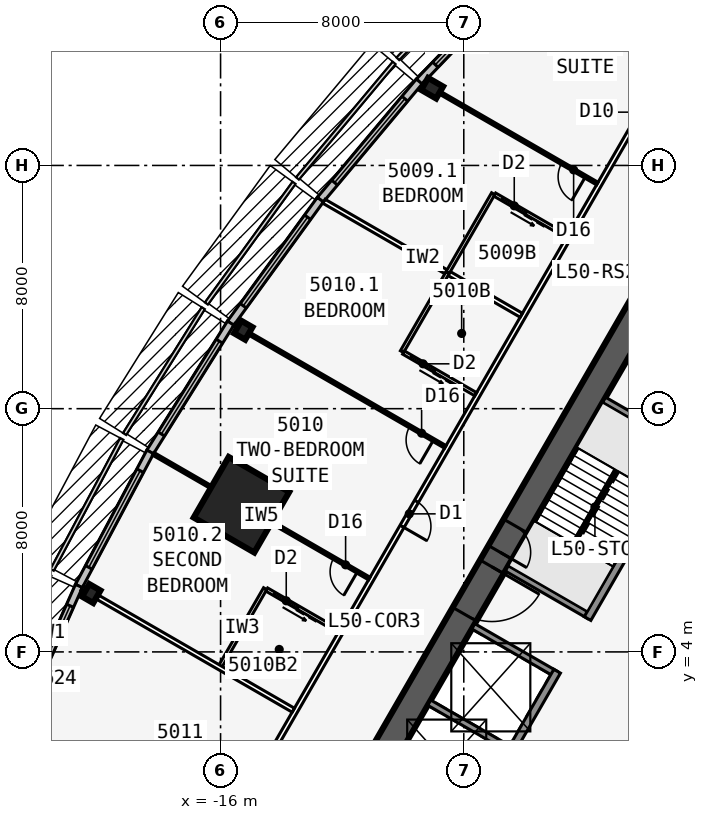
"""IFC4 building model, lengths in metres.
Left out: names, types, materials, properties, quantities, classifications, styles, units other than length and angle.
Written with IfcOpenShell. Run it as: python <this file> out.ifc"""

import sys

from ifc_helpers import new_model, si_unit, direction, frame, frame_2d, origin, origin_2d, place, context, subcontext, project, spatial, rectangle, i_section, extrude, element, fill, save


model = new_model("IFC4")
c1 = context("Model", 3, precision=1e-05, world=origin(), true_north=direction((0.0, 1.0)))
c2 = subcontext(c1, "Body", "Model", "MODEL_VIEW")
j1 = project(units=[si_unit("LENGTHUNIT", "METRE"), si_unit("PLANEANGLEUNIT", "RADIAN")], contexts=[c1])
p1 = place(None, origin())
s1 = spatial("IfcSite", under=j1, at=p1, CompositionType="ELEMENT")
p2 = place(p1, origin())
s2 = spatial("IfcBuilding", under=s1, at=p2, CompositionType="ELEMENT")
p3 = place(p2, frame((0.0, 0.0, 186.1)))
s3 = spatial("IfcBuildingStorey", under=s2, at=p3, CompositionType="ELEMENT", Elevation=186.1)
p4 = place(p3, frame((0.0, 19.052, 0.0), z_axis=(0.0, 0.0, 1.0), x_axis=(-0.499999749417, -0.866025548458, 0.0)))
e1 = element("IfcWall", 1, at=p4, inside=s3, PredefinedType="SHEAR", context=c2, shape_type="SweptSolid", body=[
    extrude(rectangle(XDim=33.0, YDim=0.9, at=frame_2d((16.5, 0.0))), origin(), (0.0, 0.0, 1.0), 3.4),
])
p5 = place(p4, frame((14.15, 0.0, 0.0)))
e2 = element("IfcOpeningElement", 2, at=p5, cuts=e1, PredefinedType="OPENING", context=c2, shape_type="SweptSolid", body=[
    extrude(rectangle(XDim=1.8, YDim=2.13, at=frame_2d((0.9, 1.065))), frame((0.0, 0.46, 0.0), z_axis=(0.0, -1.0, 0.0), x_axis=(1.0, 0.0, 0.0)), (0.0, 0.0, 1.0), 0.92),
])
p6 = place(p4, frame((12.6, 0.0, 0.0)))
e3 = element("IfcOpeningElement", 3, at=p6, cuts=e1, PredefinedType="OPENING", context=c2, shape_type="SweptSolid", body=[
    extrude(rectangle(XDim=1.0, YDim=2.13, at=frame_2d((0.5, 1.065))), frame((0.0, 0.46, 0.0), z_axis=(0.0, -1.0, 0.0), x_axis=(1.0, 0.0, 0.0)), (0.0, 0.0, 1.0), 0.92),
])
p7 = place(p3, frame((-0.062, 11.794, 0.0), z_axis=(0.0, 0.0, 1.0), x_axis=(-0.500006680225, -0.86602154692, 0.0)))
e4 = element("IfcWall", 4, at=p7, inside=s3, PredefinedType="SOLIDWALL", context=c2, shape_type="SweptSolid", body=[
    extrude(rectangle(XDim=7.733, YDim=0.25, at=frame_2d((3.866, 0.0))), origin(), (0.0, 0.0, 1.0), 3.15),
])
p8 = place(p3, frame((-4.929, 3.365, 0.0), z_axis=(0.0, 0.0, 1.0), x_axis=(-0.499991433582, -0.866030349552, 0.0)))
e5 = element("IfcWall", 5, at=p8, inside=s3, PredefinedType="SOLIDWALL", context=c2, shape_type="SweptSolid", body=[
    extrude(rectangle(XDim=10.633, YDim=0.25, at=frame_2d((5.316, 0.0))), origin(), (0.0, 0.0, 1.0), 3.15),
])
p9 = place(p8, frame((9.164, 0.0, 0.0)))
e6 = element("IfcOpeningElement", 6, at=p9, cuts=e5, PredefinedType="OPENING", context=c2, shape_type="SweptSolid", body=[
    extrude(rectangle(XDim=0.9, YDim=2.13, at=frame_2d((0.45, 1.065))), frame((0.0, 0.135, 0.0), z_axis=(0.0, -1.0, 0.0), x_axis=(1.0, 0.0, 0.0)), (0.0, 0.0, 1.0), 0.27),
])
for number, where, z_axis, x_axis in (
    (7, (-0.679, 10.727, 0.0), (0.0, 0.0, 1.0), (-0.866, 0.5, 0.0)),
    (8, (-3.879, 5.184, 0.0), (0.0, 0.0, 1.0), (-0.866, 0.5, 0.0)),
    (9, (-4.979, 3.279, 0.0), (0.0, 0.0, 1.0), (-0.866, 0.5, 0.0)),
    (10, (-6.429, 0.767, 0.0), (0.0, 0.0, 1.0), (-0.866, 0.5, 0.0)),
):
    element("IfcWall", number, at=place(p3, frame(where, z_axis=z_axis, x_axis=x_axis)), inside=s3, PredefinedType="SOLIDWALL", context=c2, shape_type="SweptSolid", body=[
        extrude(rectangle(XDim=3.125, YDim=0.2, at=frame_2d((1.562, 0.0))), origin(), (0.0, 0.0, 1.0), 3.15),
    ])
p10 = place(p3, frame((-9.041, 22.541, 0.0), z_axis=(0.0, 0.0, 1.0), x_axis=(-0.5, -0.866025403784, 0.0)))
e11 = element("IfcColumn", 11, at=p10, inside=s3, PredefinedType="COLUMN", context=c2, shape_type="SweptSolid", body=[
    extrude(i_section(OverallWidth=0.455, OverallDepth=0.569, WebThickness=0.078, FlangeThickness=0.125, at=origin_2d()), origin(), (0.0, 0.0, 1.0), 3.4),
])
for number, where, z_axis, x_axis in (
    (12, (-15.254, 14.58, 0.0), (0.0, 0.0, 1.0), (-0.866, 0.5, 0.0)),
    (13, (-20.254, 5.92, 0.0), (0.0, 0.0, 1.0), (-0.866, 0.5, 0.0)),
):
    element("IfcColumn", number, at=place(p3, frame(where, z_axis=z_axis, x_axis=x_axis)), inside=s3, PredefinedType="COLUMN", context=c2, shape_type="SweptSolid", body=[
        extrude(i_section(OverallWidth=0.424, OverallDepth=0.475, WebThickness=0.048, FlangeThickness=0.077, at=origin_2d()), origin(), (0.0, 0.0, 1.0), 3.4),
    ])
p11 = place(p3, frame((-15.312, 8.84, 0.0), z_axis=(0.0, 0.0, 1.0), x_axis=(-0.866025403784, 0.5, 0.0)))
e14 = element("IfcColumn", 14, at=p11, inside=s3, PredefinedType="COLUMN", context=c2, shape_type="SweptSolid", body=[
    extrude(rectangle(XDim=2.3, YDim=2.3, at=origin_2d()), origin(), (0.0, 0.0, 1.0), 3.4),
])
p12 = place(p3, frame((-5.91, 26.472, 0.0), z_axis=(0.0, 0.0, 1.0), x_axis=(-0.691719937936, -0.722165858693, 0.0)))
e15 = element("IfcWall", 15, at=p12, inside=s3, PredefinedType="STANDARD", context=c2, shape_type="SweptSolid", body=[
    extrude(rectangle(XDim=5.148, YDim=0.25, at=frame_2d((2.574, 0.0))), origin(), (0.0, 0.0, 1.0), 3.15),
])
p13 = place(p12, frame((0.774, 0.0, 0.45)))
e16 = element("IfcOpeningElement", 16, at=p13, cuts=e15, PredefinedType="OPENING", context=c2, shape_type="SweptSolid", body=[
    extrude(rectangle(XDim=3.6, YDim=2.4, at=frame_2d((1.8, 1.2))), frame((0.0, 0.135, 0.0), z_axis=(0.0, -1.0, 0.0), x_axis=(1.0, 0.0, 0.0)), (0.0, 0.0, 1.0), 0.27),
])
p14 = place(p3, frame((-9.465, 22.76, 0.0), z_axis=(0.0, 0.0, 1.0), x_axis=(-0.641810386606, -0.766863369607, 0.0)))
e17 = element("IfcWall", 17, at=p14, inside=s3, PredefinedType="STANDARD", context=c2, shape_type="SweptSolid", body=[
    extrude(rectangle(XDim=5.076, YDim=0.25, at=frame_2d((2.538, 0.0))), origin(), (0.0, 0.0, 1.0), 3.15),
])
p15 = place(p14, frame((0.738, 0.0, 0.45)))
e18 = element("IfcOpeningElement", 18, at=p15, cuts=e17, PredefinedType="OPENING", context=c2, shape_type="SweptSolid", body=[
    extrude(rectangle(XDim=3.6, YDim=2.4, at=frame_2d((1.8, 1.2))), frame((0.0, 0.135, 0.0), z_axis=(0.0, -1.0, 0.0), x_axis=(1.0, 0.0, 0.0)), (0.0, 0.0, 1.0), 0.27),
])
p16 = place(p3, frame((-12.718, 18.875, 0.0), z_axis=(0.0, 0.0, 1.0), x_axis=(-0.587669188412, -0.809101307001, 0.0)))
e19 = element("IfcWall", 19, at=p16, inside=s3, PredefinedType="STANDARD", context=c2, shape_type="SweptSolid", body=[
    extrude(rectangle(XDim=5.028, YDim=0.25, at=frame_2d((2.514, 0.0))), origin(), (0.0, 0.0, 1.0), 3.15),
])
p17 = place(p16, frame((0.714, 0.0, 0.45)))
e20 = element("IfcOpeningElement", 20, at=p17, cuts=e19, PredefinedType="OPENING", context=c2, shape_type="SweptSolid", body=[
    extrude(rectangle(XDim=3.6, YDim=2.4, at=frame_2d((1.8, 1.2))), frame((0.0, 0.135, 0.0), z_axis=(0.0, -1.0, 0.0), x_axis=(1.0, 0.0, 0.0)), (0.0, 0.0, 1.0), 0.27),
])
p18 = place(p3, frame((-15.667, 14.814, 0.0), z_axis=(0.0, 0.0, 1.0), x_axis=(-0.529990167382, -0.84800378683, 0.0)))
e21 = element("IfcWall", 21, at=p18, inside=s3, PredefinedType="STANDARD", context=c2, shape_type="SweptSolid", body=[
    extrude(rectangle(XDim=5.003, YDim=0.25, at=frame_2d((2.501, 0.0))), origin(), (0.0, 0.0, 1.0), 3.15),
])
p19 = place(p18, frame((0.701, 0.0, 0.45)))
e22 = element("IfcOpeningElement", 22, at=p19, cuts=e21, PredefinedType="OPENING", context=c2, shape_type="SweptSolid", body=[
    extrude(rectangle(XDim=3.6, YDim=2.4, at=frame_2d((1.8, 1.2))), frame((0.0, 0.135, 0.0), z_axis=(0.0, -1.0, 0.0), x_axis=(1.0, 0.0, 0.0)), (0.0, 0.0, 1.0), 0.27),
])
p20 = place(p3, frame((-18.314, 10.579, 0.0), z_axis=(0.0, 0.0, 1.0), x_axis=(-0.469404966864, -0.882982999317, 0.0)))
e23 = element("IfcWall", 23, at=p20, inside=s3, PredefinedType="STANDARD", context=c2, shape_type="SweptSolid", body=[
    extrude(rectangle(XDim=5.003, YDim=0.25, at=frame_2d((2.501, 0.0))), origin(), (0.0, 0.0, 1.0), 3.15),
])
p21 = place(p20, frame((0.701, 0.0, 0.45)))
e24 = element("IfcOpeningElement", 24, at=p21, cuts=e23, PredefinedType="OPENING", context=c2, shape_type="SweptSolid", body=[
    extrude(rectangle(XDim=3.6, YDim=2.4, at=frame_2d((1.8, 1.2))), frame((0.0, 0.135, 0.0), z_axis=(0.0, -1.0, 0.0), x_axis=(1.0, 0.0, 0.0)), (0.0, 0.0, 1.0), 0.27),
])
p22 = place(p3, frame((-20.659, 6.169, 0.0), z_axis=(0.0, 0.0, 1.0), x_axis=(-0.406832200364, -0.913502906808, 0.0)))
e25 = element("IfcWall", 25, at=p22, inside=s3, PredefinedType="STANDARD", context=c2, shape_type="SweptSolid", body=[
    extrude(rectangle(XDim=5.028, YDim=0.25, at=frame_2d((2.514, 0.0))), origin(), (0.0, 0.0, 1.0), 3.15),
])
p23 = place(p22, frame((0.714, 0.0, 0.45)))
e26 = element("IfcOpeningElement", 26, at=p23, cuts=e25, PredefinedType="OPENING", context=c2, shape_type="SweptSolid", body=[
    extrude(rectangle(XDim=3.6, YDim=2.4, at=frame_2d((1.8, 1.2))), frame((0.0, 0.135, 0.0), z_axis=(0.0, -1.0, 0.0), x_axis=(1.0, 0.0, 0.0)), (0.0, 0.0, 1.0), 0.27),
])
p24 = place(p3, frame((-0.5, 24.636, 0.0), z_axis=(0.0, 0.0, 1.0), x_axis=(-0.500001915564, -0.86602429783, 0.0)))
e27 = element("IfcWall", 27, at=p24, inside=s3, PredefinedType="PARTITIONING", context=c2, shape_type="SweptSolid", body=[
    extrude(rectangle(XDim=42.172, YDim=0.15, at=frame_2d((21.086, 0.0))), origin(), (0.0, 0.0, 1.0), 3.15),
])
p25 = place(p24, frame((2.338, 0.0, 0.0)))
e28 = element("IfcOpeningElement", 28, at=p25, cuts=e27, PredefinedType="OPENING", context=c2, shape_type="SweptSolid", body=[
    extrude(rectangle(XDim=0.95, YDim=2.13, at=frame_2d((0.475, 1.065))), frame((0.0, 0.085, 0.0), z_axis=(0.0, -1.0, 0.0), x_axis=(1.0, 0.0, 0.0)), (0.0, 0.0, 1.0), 0.17),
])
p26 = place(p24, frame((18.111, 0.0, 0.0)))
e29 = element("IfcOpeningElement", 29, at=p26, cuts=e27, PredefinedType="OPENING", context=c2, shape_type="SweptSolid", body=[
    extrude(rectangle(XDim=0.95, YDim=2.13, at=frame_2d((0.475, 1.065))), frame((0.0, 0.085, 0.0), z_axis=(0.0, -1.0, 0.0), x_axis=(1.0, 0.0, 0.0)), (0.0, 0.0, 1.0), 0.17),
])
p27 = place(p24, frame((28.111, 0.0, 0.0)))
e30 = element("IfcOpeningElement", 30, at=p27, cuts=e27, PredefinedType="OPENING", context=c2, shape_type="SweptSolid", body=[
    extrude(rectangle(XDim=0.95, YDim=2.13, at=frame_2d((0.475, 1.065))), frame((0.0, 0.085, 0.0), z_axis=(0.0, -1.0, 0.0), x_axis=(1.0, 0.0, 0.0)), (0.0, 0.0, 1.0), 0.17),
])
p28 = place(p24, frame((39.311, 0.0, 0.0)))
e31 = element("IfcOpeningElement", 31, at=p28, cuts=e27, PredefinedType="OPENING", context=c2, shape_type="SweptSolid", body=[
    extrude(rectangle(XDim=0.95, YDim=2.13, at=frame_2d((0.475, 1.065))), frame((0.0, 0.085, 0.0), z_axis=(0.0, -1.0, 0.0), x_axis=(1.0, 0.0, 0.0)), (0.0, 0.0, 1.0), 0.17),
])
p29 = place(p3, frame((-3.608, 19.404, 0.0), z_axis=(0.0, 0.0, 1.0), x_axis=(-0.866015989873, 0.500016305018, 0.0)))
e32 = element("IfcWall", 32, at=p29, inside=s3, PredefinedType="PARTITIONING", context=c2, shape_type="SweptSolid", body=[
    extrude(rectangle(XDim=6.616, YDim=0.1, at=frame_2d((3.308, 0.0))), origin(), (0.0, 0.0, 1.0), 2.05),
])
p30 = place(p29, frame((0.45, 0.0, 0.0)))
e33 = element("IfcOpeningElement", 33, at=p30, cuts=e32, PredefinedType="OPENING", context=c2, shape_type="SweptSolid", body=[
    extrude(rectangle(XDim=0.9, YDim=2.032, at=frame_2d((0.45, 1.016))), frame((0.0, 0.06, 0.0), z_axis=(0.0, -1.0, 0.0), x_axis=(1.0, 0.0, 0.0)), (0.0, 0.0, 1.0), 0.12),
])
p31 = place(p3, frame((-6.108, 15.073, 0.0), z_axis=(0.0, 0.0, 1.0), x_axis=(-0.866025567496, 0.499999716443, 0.0)))
e34 = element("IfcWall", 34, at=p31, inside=s3, PredefinedType="PARTITIONING", context=c2, shape_type="SweptSolid", body=[
    extrude(rectangle(XDim=7.495, YDim=0.15, at=frame_2d((3.748, 0.0))), origin(), (0.0, 0.0, 1.0), 2.108),
])
p32 = place(p3, frame((-8.608, 10.743, 0.0), z_axis=(0.0, 0.0, 1.0), x_axis=(-0.866041663918, 0.499971835565, 0.0)))
e35 = element("IfcWall", 35, at=p32, inside=s3, PredefinedType="PARTITIONING", context=c2, shape_type="SweptSolid", body=[
    extrude(rectangle(XDim=8.022, YDim=0.1, at=frame_2d((4.011, 0.0))), origin(), (0.0, 0.0, 1.0), 2.05),
])
p33 = place(p32, frame((0.45, 0.0, 0.0)))
e36 = element("IfcOpeningElement", 36, at=p33, cuts=e35, PredefinedType="OPENING", context=c2, shape_type="SweptSolid", body=[
    extrude(rectangle(XDim=0.9, YDim=2.032, at=frame_2d((0.45, 1.016))), frame((0.0, 0.06, 0.0), z_axis=(0.0, -1.0, 0.0), x_axis=(1.0, 0.0, 0.0)), (0.0, 0.0, 1.0), 0.12),
])
p34 = place(p3, frame((-11.108, 6.413, 0.0), z_axis=(0.0, 0.0, 1.0), x_axis=(-0.866026407964, 0.499998260706, 0.0)))
e37 = element("IfcWall", 37, at=p34, inside=s3, PredefinedType="PARTITIONING", context=c2, shape_type="SweptSolid", body=[
    extrude(rectangle(XDim=8.199, YDim=0.1, at=frame_2d((4.099, 0.0))), origin(), (0.0, 0.0, 1.0), 2.108),
])
p35 = place(p34, frame((0.45, 0.0, 0.0)))
e38 = element("IfcOpeningElement", 38, at=p35, cuts=e37, PredefinedType="OPENING", context=c2, shape_type="SweptSolid", body=[
    extrude(rectangle(XDim=0.9, YDim=2.032, at=frame_2d((0.45, 1.016))), frame((0.0, 0.06, 0.0), z_axis=(0.0, -1.0, 0.0), x_axis=(1.0, 0.0, 0.0)), (0.0, 0.0, 1.0), 0.12),
])
p36 = place(p3, frame((-13.608, 2.083, 0.0), z_axis=(0.0, 0.0, 1.0), x_axis=(-0.866028486751, 0.499994660107, 0.0)))
e39 = element("IfcWall", 39, at=p36, inside=s3, PredefinedType="PARTITIONING", context=c2, shape_type="SweptSolid", body=[
    extrude(rectangle(XDim=8.022, YDim=0.15, at=frame_2d((4.011, 0.0))), origin(), (0.0, 0.0, 1.0), 2.05),
])
p37 = place(p3, frame((-16.108, -2.247, 0.0), z_axis=(0.0, 0.0, 1.0), x_axis=(-0.866025567496, 0.499999716443, 0.0)))
e40 = element("IfcWall", 40, at=p37, inside=s3, PredefinedType="PARTITIONING", context=c2, shape_type="SweptSolid", body=[
    extrude(rectangle(XDim=7.495, YDim=0.1, at=frame_2d((3.748, 0.0))), origin(), (0.0, 0.0, 1.0), 2.108),
])
p38 = place(p37, frame((0.45, 0.0, 0.0)))
e41 = element("IfcOpeningElement", 41, at=p38, cuts=e40, PredefinedType="OPENING", context=c2, shape_type="SweptSolid", body=[
    extrude(rectangle(XDim=0.9, YDim=2.032, at=frame_2d((0.45, 1.016))), frame((0.0, 0.06, 0.0), z_axis=(0.0, -1.0, 0.0), x_axis=(1.0, 0.0, 0.0)), (0.0, 0.0, 1.0), 0.12),
])
p39 = place(p3, frame((-7.033, 19.072, 0.0), z_axis=(0.0, 0.0, 1.0), x_axis=(-0.499990139034, -0.866031096941, 0.0)))
e42 = element("IfcWall", 42, at=p39, inside=s3, PredefinedType="PLUMBINGWALL", context=c2, shape_type="SweptSolid", body=[
    extrude(rectangle(XDim=3.0, YDim=0.12, at=frame_2d((1.5, 0.0))), origin(), (0.0, 0.0, 1.0), 3.15),
])
p40 = place(p3, frame((-4.608, 17.671, 0.0), z_axis=(0.0, 0.0, 1.0), x_axis=(-0.865997131366, 0.500048966069, 0.0)))
e43 = element("IfcWall", 43, at=p40, inside=s3, PredefinedType="PLUMBINGWALL", context=c2, shape_type="SweptSolid", body=[
    extrude(rectangle(XDim=2.74, YDim=0.12, at=frame_2d((1.37, 0.0))), origin(), (0.0, 0.0, 1.0), 3.15),
])
p41 = place(p40, frame((1.55, 0.0, 0.0)))
e44 = element("IfcOpeningElement", 44, at=p41, cuts=e43, PredefinedType="OPENING", context=c2, shape_type="SweptSolid", body=[
    extrude(rectangle(XDim=0.9, YDim=2.13, at=frame_2d((0.45, 1.065))), frame((0.0, 0.07, 0.0), z_axis=(0.0, -1.0, 0.0), x_axis=(1.0, 0.0, 0.0)), (0.0, 0.0, 1.0), 0.14),
])
p42 = place(p3, frame((-8.533, 16.473, 0.0), z_axis=(0.0, 0.0, 1.0), x_axis=(-0.499990139034, -0.866031096941, 0.0)))
e45 = element("IfcWall", 45, at=p42, inside=s3, PredefinedType="PLUMBINGWALL", context=c2, shape_type="SweptSolid", body=[
    extrude(rectangle(XDim=3.0, YDim=0.12, at=frame_2d((1.5, 0.0))), origin(), (0.0, 0.0, 1.0), 3.15),
])
p43 = place(p3, frame((-7.608, 12.475, 0.0), z_axis=(0.0, 0.0, 1.0), x_axis=(-0.866035715982, 0.499982138324, 0.0)))
e46 = element("IfcWall", 46, at=p43, inside=s3, PredefinedType="PLUMBINGWALL", context=c2, shape_type="SweptSolid", body=[
    extrude(rectangle(XDim=2.74, YDim=0.12, at=frame_2d((1.37, 0.0))), origin(), (0.0, 0.0, 1.0), 3.15),
])
p44 = place(p43, frame((1.55, 0.0, 0.0)))
e47 = element("IfcOpeningElement", 47, at=p44, cuts=e46, PredefinedType="OPENING", context=c2, shape_type="SweptSolid", body=[
    extrude(rectangle(XDim=0.9, YDim=2.13, at=frame_2d((0.45, 1.065))), frame((0.0, 0.07, 0.0), z_axis=(0.0, -1.0, 0.0), x_axis=(1.0, 0.0, 0.0)), (0.0, 0.0, 1.0), 0.14),
])
p45 = place(p3, frame((-14.533, 6.081, 0.0), z_axis=(0.0, 0.0, 1.0), x_axis=(-0.499990139034, -0.866031096941, 0.0)))
e48 = element("IfcWall", 48, at=p45, inside=s3, PredefinedType="PLUMBINGWALL", context=c2, shape_type="SweptSolid", body=[
    extrude(rectangle(XDim=3.0, YDim=0.12, at=frame_2d((1.5, 0.0))), origin(), (0.0, 0.0, 1.0), 3.15),
])
p46 = place(p3, frame((-12.108, 4.681, 0.0), z_axis=(0.0, 0.0, 1.0), x_axis=(-0.866035715982, 0.499982138324, 0.0)))
e49 = element("IfcWall", 49, at=p46, inside=s3, PredefinedType="PLUMBINGWALL", context=c2, shape_type="SweptSolid", body=[
    extrude(rectangle(XDim=2.74, YDim=0.12, at=frame_2d((1.37, 0.0))), origin(), (0.0, 0.0, 1.0), 3.15),
])
p47 = place(p46, frame((1.55, 0.0, 0.0)))
e50 = element("IfcOpeningElement", 50, at=p47, cuts=e49, PredefinedType="OPENING", context=c2, shape_type="SweptSolid", body=[
    extrude(rectangle(XDim=0.9, YDim=2.13, at=frame_2d((0.45, 1.065))), frame((0.0, 0.07, 0.0), z_axis=(0.0, -1.0, 0.0), x_axis=(1.0, 0.0, 0.0)), (0.0, 0.0, 1.0), 0.14),
])
p48 = place(p3, frame((-2.988, 9.978, 0.0), z_axis=(0.0, 0.0, 1.0), x_axis=(-0.499992232847, -0.866029888106, 0.0)))
e51 = element("IfcWall", 51, at=p48, inside=s3, PredefinedType="SOLIDWALL", context=c2, shape_type="SweptSolid", body=[
    extrude(rectangle(XDim=2.794, YDim=0.1, at=frame_2d((1.397, 0.0))), origin(), (0.0, 0.0, 1.0), 3.4),
])
p49 = place(p13, origin())
e52 = element("IfcWindow", 52, at=p49, inside=s3, PartitioningType="SINGLE_PANEL", PredefinedType="WINDOW", context=c2, shape_type="SweptSolid", body=[
    extrude(rectangle(XDim=3.6, YDim=2.4, at=frame_2d((1.8, 1.2))), frame((0.0, 0.03, 0.0), z_axis=(0.0, -1.0, 0.0), x_axis=(1.0, 0.0, 0.0)), (0.0, 0.0, 1.0), 0.06),
])
fill(e16, e52)
p50 = place(p15, origin())
e53 = element("IfcWindow", 53, at=p50, inside=s3, PartitioningType="SINGLE_PANEL", PredefinedType="WINDOW", context=c2, shape_type="SweptSolid", body=[
    extrude(rectangle(XDim=3.6, YDim=2.4, at=frame_2d((1.8, 1.2))), frame((0.0, 0.03, 0.0), z_axis=(0.0, -1.0, 0.0), x_axis=(1.0, 0.0, 0.0)), (0.0, 0.0, 1.0), 0.06),
])
fill(e18, e53)
p51 = place(p17, origin())
e54 = element("IfcWindow", 54, at=p51, inside=s3, PartitioningType="SINGLE_PANEL", PredefinedType="WINDOW", context=c2, shape_type="SweptSolid", body=[
    extrude(rectangle(XDim=3.6, YDim=2.4, at=frame_2d((1.8, 1.2))), frame((0.0, 0.03, 0.0), z_axis=(0.0, -1.0, 0.0), x_axis=(1.0, 0.0, 0.0)), (0.0, 0.0, 1.0), 0.06),
])
fill(e20, e54)
p52 = place(p19, origin())
e55 = element("IfcWindow", 55, at=p52, inside=s3, PartitioningType="SINGLE_PANEL", PredefinedType="WINDOW", context=c2, shape_type="SweptSolid", body=[
    extrude(rectangle(XDim=3.6, YDim=2.4, at=frame_2d((1.8, 1.2))), frame((0.0, 0.03, 0.0), z_axis=(0.0, -1.0, 0.0), x_axis=(1.0, 0.0, 0.0)), (0.0, 0.0, 1.0), 0.06),
])
fill(e22, e55)
p53 = place(p21, origin())
e56 = element("IfcWindow", 56, at=p53, inside=s3, PartitioningType="SINGLE_PANEL", PredefinedType="WINDOW", context=c2, shape_type="SweptSolid", body=[
    extrude(rectangle(XDim=3.6, YDim=2.4, at=frame_2d((1.8, 1.2))), frame((0.0, 0.03, 0.0), z_axis=(0.0, -1.0, 0.0), x_axis=(1.0, 0.0, 0.0)), (0.0, 0.0, 1.0), 0.06),
])
fill(e24, e56)
p54 = place(p23, origin())
e57 = element("IfcWindow", 57, at=p54, inside=s3, PartitioningType="SINGLE_PANEL", PredefinedType="WINDOW", context=c2, shape_type="SweptSolid", body=[
    extrude(rectangle(XDim=3.6, YDim=2.4, at=frame_2d((1.8, 1.2))), frame((0.0, 0.03, 0.0), z_axis=(0.0, -1.0, 0.0), x_axis=(1.0, 0.0, 0.0)), (0.0, 0.0, 1.0), 0.06),
])
fill(e26, e57)
p55 = place(p30, origin())
e58 = element("IfcDoor", 58, at=p55, inside=s3, OperationType="SINGLE_SWING_LEFT", PredefinedType="DOOR", context=c2, shape_type="SweptSolid", body=[
    extrude(rectangle(XDim=0.9, YDim=2.032, at=frame_2d((0.45, 1.016))), frame((0.0, 0.025, 0.0), z_axis=(0.0, -1.0, 0.0), x_axis=(1.0, 0.0, 0.0)), (0.0, 0.0, 1.0), 0.05),
])
fill(e33, e58)
p56 = place(p33, origin())
e59 = element("IfcDoor", 59, at=p56, inside=s3, OperationType="SINGLE_SWING_LEFT", PredefinedType="DOOR", context=c2, shape_type="SweptSolid", body=[
    extrude(rectangle(XDim=0.9, YDim=2.032, at=frame_2d((0.45, 1.016))), frame((0.0, 0.025, 0.0), z_axis=(0.0, -1.0, 0.0), x_axis=(1.0, 0.0, 0.0)), (0.0, 0.0, 1.0), 0.05),
])
fill(e36, e59)
p57 = place(p35, origin())
e60 = element("IfcDoor", 60, at=p57, inside=s3, OperationType="SINGLE_SWING_LEFT", PredefinedType="DOOR", context=c2, shape_type="SweptSolid", body=[
    extrude(rectangle(XDim=0.9, YDim=2.032, at=frame_2d((0.45, 1.016))), frame((0.0, 0.025, 0.0), z_axis=(0.0, -1.0, 0.0), x_axis=(1.0, 0.0, 0.0)), (0.0, 0.0, 1.0), 0.05),
])
fill(e38, e60)
p58 = place(p41, origin())
e61 = element("IfcDoor", 61, at=p58, inside=s3, OperationType="SLIDING_TO_LEFT", PredefinedType="DOOR", context=c2, shape_type="SweptSolid", body=[
    extrude(rectangle(XDim=0.9, YDim=2.13, at=frame_2d((0.45, 1.065))), frame((0.0, 0.025, 0.0), z_axis=(0.0, -1.0, 0.0), x_axis=(1.0, 0.0, 0.0)), (0.0, 0.0, 1.0), 0.05),
])
fill(e44, e61)
p59 = place(p44, origin())
e62 = element("IfcDoor", 62, at=p59, inside=s3, OperationType="SLIDING_TO_LEFT", PredefinedType="DOOR", context=c2, shape_type="SweptSolid", body=[
    extrude(rectangle(XDim=0.9, YDim=2.13, at=frame_2d((0.45, 1.065))), frame((0.0, 0.025, 0.0), z_axis=(0.0, -1.0, 0.0), x_axis=(1.0, 0.0, 0.0)), (0.0, 0.0, 1.0), 0.05),
])
fill(e47, e62)
p60 = place(p26, origin())
e63 = element("IfcDoor", 63, at=p60, inside=s3, OperationType="SINGLE_SWING_RIGHT", PredefinedType="DOOR", context=c2, shape_type="SweptSolid", body=[
    extrude(rectangle(XDim=0.95, YDim=2.13, at=frame_2d((0.475, 1.065))), frame((0.0, 0.025, 0.0), z_axis=(0.0, -1.0, 0.0), x_axis=(1.0, 0.0, 0.0)), (0.0, 0.0, 1.0), 0.05),
])
fill(e29, e63)
p61 = place(p47, origin())
e64 = element("IfcDoor", 64, at=p61, inside=s3, OperationType="SLIDING_TO_LEFT", PredefinedType="DOOR", context=c2, shape_type="SweptSolid", body=[
    extrude(rectangle(XDim=0.9, YDim=2.13, at=frame_2d((0.45, 1.065))), frame((0.0, 0.025, 0.0), z_axis=(0.0, -1.0, 0.0), x_axis=(1.0, 0.0, 0.0)), (0.0, 0.0, 1.0), 0.05),
])
fill(e50, e64)
p62 = place(p5, origin())
e65 = element("IfcDoor", 65, at=p62, inside=s3, OperationType="DOUBLE_DOOR_SINGLE_SWING", PredefinedType="DOOR", context=c2, shape_type="SweptSolid", body=[
    extrude(rectangle(XDim=1.8, YDim=2.13, at=frame_2d((0.9, 1.065))), frame((0.0, 0.025, 0.0), z_axis=(0.0, -1.0, 0.0), x_axis=(1.0, 0.0, 0.0)), (0.0, 0.0, 1.0), 0.05),
])
fill(e2, e65)
p63 = place(p6, origin())
e66 = element("IfcDoor", 66, at=p63, inside=s3, OperationType="SINGLE_SWING_RIGHT", PredefinedType="DOOR", context=c2, shape_type="SweptSolid", body=[
    extrude(rectangle(XDim=1.0, YDim=2.13, at=frame_2d((0.5, 1.065))), frame((0.0, 0.025, 0.0), z_axis=(0.0, -1.0, 0.0), x_axis=(1.0, 0.0, 0.0)), (0.0, 0.0, 1.0), 0.05),
])
fill(e3, e66)
save(model, sys.argv[1])
